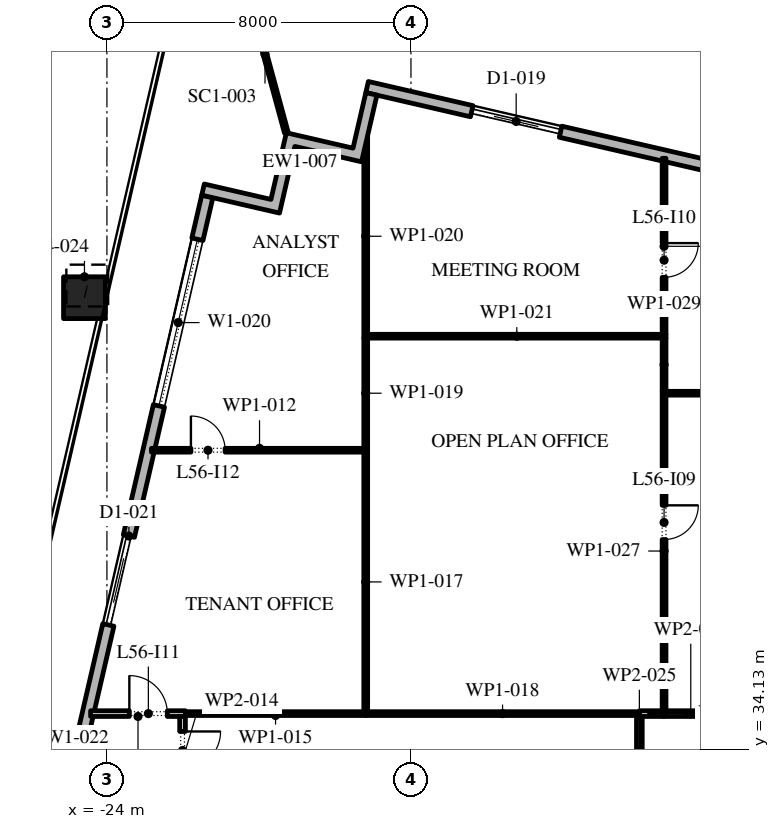
"""IFC4 building model, lengths in metres.
Left out: names, types, materials, properties, quantities, classifications, styles, units other than length and angle.
Written with IfcOpenShell. Run it as: python <this file> out.ifc"""

import sys

from ifc_helpers import new_model, si_unit, direction, frame, frame_2d, origin, origin_2d, place, context, subcontext, project, spatial, polyline, rectangle, outline, extrude, element, fill, save


model = new_model("IFC4")
c1 = context("Model", 3, precision=1e-05, world=origin(), true_north=direction((0.0, 1.0)))
c2 = subcontext(c1, "Body", "Model", "MODEL_VIEW")
j1 = project(units=[si_unit("LENGTHUNIT", "METRE"), si_unit("PLANEANGLEUNIT", "RADIAN")], contexts=[c1])
p1 = place(None, origin())
s1 = spatial("IfcSite", under=j1, at=p1, CompositionType="ELEMENT")
p2 = place(p1, origin())
s2 = spatial("IfcBuilding", under=s1, at=p2, CompositionType="ELEMENT")
p3 = place(p2, frame((0.0, 0.0, 259.8)))
s3 = spatial("IfcBuildingStorey", under=s2, at=p3, CompositionType="ELEMENT", Elevation=259.8)
p4 = place(p3, frame((-24.591, 46.014, 0.0), z_axis=(0.017502025619, 0.075687567741, 0.996977969259), x_axis=(-0.974290512438, 0.225295355862, 0.0)))
e1 = element("IfcColumn", 1, at=p4, inside=s3, PredefinedType="COLUMN", context=c2, shape_type="SweptSolid", body=[
    extrude(rectangle(XDim=1.1, YDim=1.1, at=origin_2d()), origin(), (0.0, 0.0, 1.0), 4.213),
])
p5 = place(p3, frame((29.616, 40.758, 0.0), z_axis=(0.0, 0.0, 1.0), x_axis=(-0.974370532314, 0.224949029246, 0.0)))
e2 = element("IfcWall", 2, at=p5, inside=s3, PredefinedType="STANDARD", context=c2, shape_type="SweptSolid", body=[
    extrude(rectangle(XDim=48.0, YDim=0.3, at=frame_2d((24.0, 0.0))), origin(), (0.0, 0.0, 1.0), 4.0),
])
p6 = place(p5, frame((1.625, 0.0, 0.45)))
e3 = element("IfcOpeningElement", 3, at=p6, cuts=e2, PredefinedType="OPENING", context=c2, shape_type="SweptSolid", body=[
    extrude(rectangle(XDim=4.5, YDim=2.65, at=frame_2d((2.25, 1.325))), frame((0.0, 0.16, 0.0), z_axis=(0.0, -1.0, 0.0), x_axis=(1.0, 0.0, 0.0)), (0.0, 0.0, 1.0), 0.32),
])
p7 = place(p5, frame((10.575, 0.0, 0.0)))
e4 = element("IfcOpeningElement", 4, at=p7, cuts=e2, PredefinedType="OPENING", context=c2, shape_type="SweptSolid", body=[
    extrude(rectangle(XDim=2.4, YDim=3.5, at=frame_2d((1.2, 1.75))), frame((0.0, 0.16, 0.0), z_axis=(0.0, -1.0, 0.0), x_axis=(1.0, 0.0, 0.0)), (0.0, 0.0, 1.0), 0.32),
])
p8 = place(p5, frame((17.575, 0.0, 0.45)))
e5 = element("IfcOpeningElement", 5, at=p8, cuts=e2, PredefinedType="OPENING", context=c2, shape_type="SweptSolid", body=[
    extrude(rectangle(XDim=4.5, YDim=2.5, at=frame_2d((2.25, 1.25))), frame((0.0, 0.16, 0.0), z_axis=(0.0, -1.0, 0.0), x_axis=(1.0, 0.0, 0.0)), (0.0, 0.0, 1.0), 0.32),
])
p9 = place(p5, frame((25.625, 0.0, 0.45)))
e6 = element("IfcOpeningElement", 6, at=p9, cuts=e2, PredefinedType="OPENING", context=c2, shape_type="SweptSolid", body=[
    extrude(rectangle(XDim=4.5, YDim=2.45, at=frame_2d((2.25, 1.225))), frame((0.0, 0.16, 0.0), z_axis=(0.0, -1.0, 0.0), x_axis=(1.0, 0.0, 0.0)), (0.0, 0.0, 1.0), 0.32),
])
p10 = place(p5, frame((33.675, 0.0, 0.45)))
e7 = element("IfcOpeningElement", 7, at=p10, cuts=e2, PredefinedType="OPENING", context=c2, shape_type="SweptSolid", body=[
    extrude(rectangle(XDim=4.5, YDim=2.45, at=frame_2d((2.25, 1.225))), frame((0.0, 0.16, 0.0), z_axis=(0.0, -1.0, 0.0), x_axis=(1.0, 0.0, 0.0)), (0.0, 0.0, 1.0), 0.32),
])
p11 = place(p5, frame((42.775, 0.0, 0.0)))
e8 = element("IfcOpeningElement", 8, at=p11, cuts=e2, PredefinedType="OPENING", context=c2, shape_type="SweptSolid", body=[
    extrude(rectangle(XDim=2.4, YDim=3.5, at=frame_2d((1.2, 1.75))), frame((0.0, 0.16, 0.0), z_axis=(0.0, -1.0, 0.0), x_axis=(1.0, 0.0, 0.0)), (0.0, 0.0, 1.0), 0.32),
])
p12 = place(p3, frame((-21.359, 48.678, 0.0), z_axis=(0.0, 0.0, 1.0), x_axis=(-0.224949198343, -0.974370493275, 0.0)))
e9 = element("IfcWall", 9, at=p12, inside=s3, PredefinedType="STANDARD", context=c2, shape_type="SweptSolid", body=[
    extrude(rectangle(XDim=49.5, YDim=0.3, at=frame_2d((24.75, 0.0))), origin(), (0.0, 0.0, 1.0), 4.0),
])
p13 = place(p12, frame((1.157, 0.0, 0.45)))
e10 = element("IfcOpeningElement", 10, at=p13, cuts=e9, PredefinedType="OPENING", context=c2, shape_type="SweptSolid", body=[
    extrude(rectangle(XDim=4.5, YDim=3.05, at=frame_2d((2.25, 1.525))), frame((0.0, 0.16, 0.0), z_axis=(0.0, -1.0, 0.0), x_axis=(1.0, 0.0, 0.0)), (0.0, 0.0, 1.0), 0.32),
])
p14 = place(p12, frame((9.171, 0.0, 0.0)))
e11 = element("IfcOpeningElement", 11, at=p14, cuts=e9, PredefinedType="OPENING", context=c2, shape_type="SweptSolid", body=[
    extrude(rectangle(XDim=2.4, YDim=3.5, at=frame_2d((1.2, 1.75))), frame((0.0, 0.16, 0.0), z_axis=(0.0, -1.0, 0.0), x_axis=(1.0, 0.0, 0.0)), (0.0, 0.0, 1.0), 0.32),
])
p15 = place(p12, frame((15.236, 0.0, 0.45)))
e12 = element("IfcOpeningElement", 12, at=p15, cuts=e9, PredefinedType="OPENING", context=c2, shape_type="SweptSolid", body=[
    extrude(rectangle(XDim=4.5, YDim=3.05, at=frame_2d((2.25, 1.525))), frame((0.0, 0.16, 0.0), z_axis=(0.0, -1.0, 0.0), x_axis=(1.0, 0.0, 0.0)), (0.0, 0.0, 1.0), 0.32),
])
p16 = place(p12, frame((22.35, 0.0, 0.45)))
e13 = element("IfcOpeningElement", 13, at=p16, cuts=e9, PredefinedType="OPENING", context=c2, shape_type="SweptSolid", body=[
    extrude(rectangle(XDim=4.5, YDim=3.05, at=frame_2d((2.25, 1.525))), frame((0.0, 0.16, 0.0), z_axis=(0.0, -1.0, 0.0), x_axis=(1.0, 0.0, 0.0)), (0.0, 0.0, 1.0), 0.32),
])
p17 = place(p12, frame((29.464, 0.0, 0.45)))
e14 = element("IfcOpeningElement", 14, at=p17, cuts=e9, PredefinedType="OPENING", context=c2, shape_type="SweptSolid", body=[
    extrude(rectangle(XDim=4.5, YDim=3.05, at=frame_2d((2.25, 1.525))), frame((0.0, 0.16, 0.0), z_axis=(0.0, -1.0, 0.0), x_axis=(1.0, 0.0, 0.0)), (0.0, 0.0, 1.0), 0.32),
])
p18 = place(p12, frame((37.628, 0.0, 0.0)))
e15 = element("IfcOpeningElement", 15, at=p18, cuts=e9, PredefinedType="OPENING", context=c2, shape_type="SweptSolid", body=[
    extrude(rectangle(XDim=2.4, YDim=3.325, at=frame_2d((1.2, 1.663))), frame((0.0, 0.16, 0.0), z_axis=(0.0, -1.0, 0.0), x_axis=(1.0, 0.0, 0.0)), (0.0, 0.0, 1.0), 0.32),
])
p19 = place(p12, frame((43.693, 0.0, 0.45)))
e16 = element("IfcOpeningElement", 16, at=p19, cuts=e9, PredefinedType="OPENING", context=c2, shape_type="SweptSolid", body=[
    extrude(rectangle(XDim=4.5, YDim=2.825, at=frame_2d((2.25, 1.413))), frame((0.0, 0.16, 0.0), z_axis=(0.0, -1.0, 0.0), x_axis=(1.0, 0.0, 0.0)), (0.0, 0.0, 1.0), 0.32),
])
p20 = place(p3, origin())
e17 = element("IfcWall", 17, at=p20, inside=s3, PredefinedType="STANDARD", context=c2, shape_type="SweptSolid", body=[
    extrude(outline(polyline([(-21.505, 48.712), (-21.438, 49.004), (-19.684, 48.599), (-19.279, 50.353), (-17.525, 49.948), (-17.188, 51.41), (-16.895, 51.342), (-17.3, 49.588), (-19.054, 49.993), (-19.459, 48.24), (-21.505, 48.712)])), origin(), (0.0, 0.0, 1.0), 4.0),
])
p21 = place(p3, frame((-19.279, 50.353, -0.05), z_axis=(0.0, 0.0, 1.0), x_axis=(-0.262465429481, 0.964941396318, 0.0)))
e18 = element("IfcWall", 18, at=p21, inside=s3, PredefinedType="STANDARD", context=c2, shape_type="SweptSolid", body=[
    extrude(rectangle(XDim=4.278, YDim=0.1, at=frame_2d((2.139, 0.0))), origin(), (0.0, 0.0, 1.0), 4.05),
])
p22 = place(p3, frame((-24.429, 35.07, 0.0), z_axis=(0.0, 0.0, 1.0), x_axis=(1.0, 0.0, 0.0)))
e19 = element("IfcWall", 19, at=p22, inside=s3, PredefinedType="PARTITIONING", context=c2, shape_type="SweptSolid", body=[
    extrude(rectangle(XDim=2.494, YDim=0.15, at=frame_2d((1.247, 0.0))), origin(), (0.0, 0.0, 1.0), 4.0),
])
p23 = place(p22, frame((1.019, 0.0, 0.0)))
e20 = element("IfcOpeningElement", 20, at=p23, cuts=e19, PredefinedType="OPENING", context=c2, shape_type="SweptSolid", body=[
    extrude(rectangle(XDim=1.0, YDim=2.1, at=frame_2d((0.5, 1.05))), frame((0.0, 0.085, 0.0), z_axis=(0.0, -1.0, 0.0), x_axis=(1.0, 0.0, 0.0)), (0.0, 0.0, 1.0), 0.17),
])
p24 = place(p3, frame((-22.829, 42.0, 0.0), z_axis=(0.0, 0.0, 1.0), x_axis=(1.0, 0.0, 0.0)))
e21 = element("IfcWall", 21, at=p24, inside=s3, PredefinedType="PARTITIONING", context=c2, shape_type="SweptSolid", body=[
    extrude(rectangle(XDim=5.689, YDim=0.1, at=frame_2d((2.845, 0.0))), origin(), (0.0, 0.0, 1.0), 4.0),
])
p25 = place(p24, frame((1.039, 0.0, 0.0)))
e22 = element("IfcOpeningElement", 22, at=p25, cuts=e21, PredefinedType="OPENING", context=c2, shape_type="SweptSolid", body=[
    extrude(rectangle(XDim=0.9, YDim=2.1, at=frame_2d((0.45, 1.05))), frame((0.0, 0.06, 0.0), z_axis=(0.0, -1.0, 0.0), x_axis=(1.0, 0.0, 0.0)), (0.0, 0.0, 1.0), 0.12),
])
p26 = place(p3, frame((-22.01, 34.995, 0.0), z_axis=(0.0, 0.0, 1.0), x_axis=(0.0, -1.0, 0.0)))
e23 = element("IfcWall", 23, at=p26, inside=s3, PredefinedType="PARTITIONING", context=c2, shape_type="SweptSolid", body=[
    extrude(rectangle(XDim=2.295, YDim=0.15, at=frame_2d((1.147, 0.0))), origin(), (0.0, 0.0, 1.0), 4.0),
])
p27 = place(p26, frame((0.395, 0.0, 0.0)))
e24 = element("IfcOpeningElement", 24, at=p27, cuts=e23, PredefinedType="OPENING", context=c2, shape_type="SweptSolid", body=[
    extrude(rectangle(XDim=1.0, YDim=2.1, at=frame_2d((0.5, 1.05))), frame((0.0, 0.085, 0.0), z_axis=(0.0, -1.0, 0.0), x_axis=(1.0, 0.0, 0.0)), (0.0, 0.0, 1.0), 0.17),
])
p28 = place(p3, frame((-21.935, 35.07, 0.0), z_axis=(0.0, 0.0, 1.0), x_axis=(1.0, 0.0, 0.0)))
e25 = element("IfcWall", 25, at=p28, inside=s3, PredefinedType="PARTITIONING", context=c2, shape_type="SweptSolid", body=[
    extrude(rectangle(XDim=4.745, YDim=0.1, at=frame_2d((2.373, 0.0))), origin(), (0.0, 0.0, 1.0), 4.0),
])
p29 = place(p3, frame((-17.19, 35.12, 0.0), z_axis=(0.0, 0.0, 1.0), x_axis=(0.0, 1.0, 0.0)))
e26 = element("IfcWall", 26, at=p29, inside=s3, PredefinedType="PARTITIONING", context=c2, shape_type="SweptSolid", body=[
    extrude(rectangle(XDim=6.83, YDim=0.1, at=frame_2d((3.415, 0.0))), origin(), (0.0, 0.0, 1.0), 4.0),
])
p30 = place(p3, frame((-17.19, 35.07, 0.0), z_axis=(0.0, 0.0, 1.0), x_axis=(1.0, 0.0, 0.0)))
e27 = element("IfcWall", 27, at=p30, inside=s3, PredefinedType="PARTITIONING", context=c2, shape_type="SweptSolid", body=[
    extrude(rectangle(XDim=7.2, YDim=0.1, at=frame_2d((3.6, 0.0))), origin(), (0.0, 0.0, 1.0), 4.0),
])
p31 = place(p3, frame((-17.19, 42.05, 0.0), z_axis=(0.0, 0.0, 1.0), x_axis=(0.0, 1.0, 0.0)))
e28 = element("IfcWall", 28, at=p31, inside=s3, PredefinedType="PARTITIONING", context=c2, shape_type="SweptSolid", body=[
    extrude(rectangle(XDim=2.9, YDim=0.1, at=frame_2d((1.45, 0.0))), origin(), (0.0, 0.0, 1.0), 4.0),
])
p32 = place(p3, frame((-17.19, 44.95, 0.0), z_axis=(0.0, 0.0, 1.0), x_axis=(0.0, 1.0, 0.0)))
e29 = element("IfcWall", 29, at=p32, inside=s3, PredefinedType="PARTITIONING", context=c2, shape_type="SweptSolid", body=[
    extrude(rectangle(XDim=5.36, YDim=0.1, at=frame_2d((2.68, 0.0))), origin(), (0.0, 0.0, 1.0), 4.0),
])
p33 = place(p3, frame((-17.14, 45.0, 0.0), z_axis=(0.0, 0.0, 1.0), x_axis=(1.0, 0.0, 0.0)))
e30 = element("IfcWall", 30, at=p33, inside=s3, PredefinedType="PARTITIONING", context=c2, shape_type="SweptSolid", body=[
    extrude(rectangle(XDim=7.85, YDim=0.1, at=frame_2d((3.925, 0.0))), origin(), (0.0, 0.0, 1.0), 4.0),
])
p34 = place(p3, frame((-9.99, 32.7, 0.0), z_axis=(0.0, 0.0, 1.0), x_axis=(0.0, 1.0, 0.0)))
e31 = element("IfcWall", 31, at=p34, inside=s3, PredefinedType="PARTITIONING", context=c2, shape_type="SweptSolid", body=[
    extrude(rectangle(XDim=2.32, YDim=0.15, at=frame_2d((1.16, 0.0))), origin(), (0.0, 0.0, 1.0), 4.0),
])
p35 = place(p3, frame((-9.99, 35.07, 0.0), z_axis=(0.0, 0.0, 1.0), x_axis=(1.0, 0.0, 0.0)))
e32 = element("IfcWall", 32, at=p35, inside=s3, PredefinedType="PARTITIONING", context=c2, shape_type="SweptSolid", body=[
    extrude(rectangle(XDim=0.65, YDim=0.15, at=frame_2d((0.325, 0.0))), origin(), (0.0, 0.0, 1.0), 4.0),
])
p36 = place(p3, frame((-9.34, 35.145, 0.0), z_axis=(0.0, 0.0, 1.0), x_axis=(0.0, 1.0, 0.0)))
e33 = element("IfcWall", 33, at=p36, inside=s3, PredefinedType="PARTITIONING", context=c2, shape_type="SweptSolid", body=[
    extrude(rectangle(XDim=8.405, YDim=0.1, at=frame_2d((4.203, 0.0))), origin(), (0.0, 0.0, 1.0), 4.0),
])
p37 = place(p36, frame((4.505, 0.0, 0.0)))
e34 = element("IfcOpeningElement", 34, at=p37, cuts=e33, PredefinedType="OPENING", context=c2, shape_type="SweptSolid", body=[
    extrude(rectangle(XDim=0.9, YDim=2.1, at=frame_2d((0.45, 1.05))), frame((0.0, 0.06, 0.0), z_axis=(0.0, -1.0, 0.0), x_axis=(1.0, 0.0, 0.0)), (0.0, 0.0, 1.0), 0.12),
])
p38 = place(p3, frame((-9.34, 35.07, 0.0), z_axis=(0.0, 0.0, 1.0), x_axis=(1.0, 0.0, 0.0)))
e35 = element("IfcWall", 35, at=p38, inside=s3, PredefinedType="PARTITIONING", context=c2, shape_type="SweptSolid", body=[
    extrude(rectangle(XDim=1.405, YDim=0.15, at=frame_2d((0.703, 0.0))), origin(), (0.0, 0.0, 1.0), 4.0),
])
p39 = place(p3, frame((-9.34, 43.55, 0.0), z_axis=(0.0, 0.0, 1.0), x_axis=(0.0, 1.0, 0.0)))
e36 = element("IfcWall", 36, at=p39, inside=s3, PredefinedType="PARTITIONING", context=c2, shape_type="SweptSolid", body=[
    extrude(rectangle(XDim=1.4, YDim=0.1, at=frame_2d((0.7, 0.0))), origin(), (0.0, 0.0, 1.0), 4.0),
])
p40 = place(p3, frame((-9.29, 43.5, 0.0), z_axis=(0.0, 0.0, 1.0), x_axis=(1.0, 0.0, 0.0)))
e37 = element("IfcWall", 37, at=p40, inside=s3, PredefinedType="PARTITIONING", context=c2, shape_type="SweptSolid", body=[
    extrude(rectangle(XDim=8.265, YDim=0.1, at=frame_2d((4.133, 0.0))), origin(), (0.0, 0.0, 1.0), 4.0),
])
p41 = place(p3, frame((-9.34, 45.05, 0.0), z_axis=(0.0, 0.0, 1.0), x_axis=(0.0, 1.0, 0.0)))
e38 = element("IfcWall", 38, at=p41, inside=s3, PredefinedType="PARTITIONING", context=c2, shape_type="SweptSolid", body=[
    extrude(rectangle(XDim=4.631, YDim=0.1, at=frame_2d((2.315, 0.0))), origin(), (0.0, 0.0, 1.0), 4.0),
])
p42 = place(p41, frame((1.5, 0.0, 0.0)))
e39 = element("IfcOpeningElement", 39, at=p42, cuts=e38, PredefinedType="OPENING", context=c2, shape_type="SweptSolid", body=[
    extrude(rectangle(XDim=0.9, YDim=2.1, at=frame_2d((0.45, 1.05))), frame((0.0, 0.06, 0.0), z_axis=(0.0, -1.0, 0.0), x_axis=(1.0, 0.0, 0.0)), (0.0, 0.0, 1.0), 0.12),
])
p43 = place(p11, origin())
e40 = element("IfcDoor", 40, at=p43, inside=s3, OperationType="DOUBLE_DOOR_SLIDING", PredefinedType="DOOR", context=c2, shape_type="SweptSolid", body=[
    extrude(rectangle(XDim=2.4, YDim=3.5, at=frame_2d((1.2, 1.75))), frame((0.0, 0.025, 0.0), z_axis=(0.0, -1.0, 0.0), x_axis=(1.0, 0.0, 0.0)), (0.0, 0.0, 1.0), 0.05),
])
fill(e8, e40)
p44 = place(p13, origin())
e41 = element("IfcWindow", 41, at=p44, inside=s3, PartitioningType="DOUBLE_PANEL_VERTICAL", PredefinedType="WINDOW", context=c2, shape_type="SweptSolid", body=[
    extrude(rectangle(XDim=4.5, YDim=3.05, at=frame_2d((2.25, 1.525))), frame((0.0, 0.03, 0.0), z_axis=(0.0, -1.0, 0.0), x_axis=(1.0, 0.0, 0.0)), (0.0, 0.0, 1.0), 0.06),
])
fill(e10, e41)
p45 = place(p14, origin())
e42 = element("IfcDoor", 42, at=p45, inside=s3, OperationType="DOUBLE_DOOR_SLIDING", PredefinedType="DOOR", context=c2, shape_type="SweptSolid", body=[
    extrude(rectangle(XDim=2.4, YDim=3.5, at=frame_2d((1.2, 1.75))), frame((0.0, 0.025, 0.0), z_axis=(0.0, -1.0, 0.0), x_axis=(1.0, 0.0, 0.0)), (0.0, 0.0, 1.0), 0.05),
])
fill(e11, e42)
p46 = place(p27, origin())
e43 = element("IfcDoor", 43, at=p46, inside=s3, OperationType="SINGLE_SWING_RIGHT", PredefinedType="DOOR", context=c2, shape_type="SweptSolid", body=[
    extrude(rectangle(XDim=1.0, YDim=2.1, at=frame_2d((0.5, 1.05))), frame((0.0, 0.025, 0.0), z_axis=(0.0, -1.0, 0.0), x_axis=(1.0, 0.0, 0.0)), (0.0, 0.0, 1.0), 0.05),
])
fill(e24, e43)
p47 = place(p37, frame((0.9, 0.0, 0.0), z_axis=(0.0, 0.0, 1.0), x_axis=(-1.0, 0.0, 0.0)))
e44 = element("IfcDoor", 44, at=p47, inside=s3, OperationType="SINGLE_SWING_RIGHT", PredefinedType="DOOR", context=c2, shape_type="SweptSolid", body=[
    extrude(rectangle(XDim=0.9, YDim=2.1, at=frame_2d((0.45, 1.05))), frame((0.0, 0.025, 0.0), z_axis=(0.0, -1.0, 0.0), x_axis=(1.0, 0.0, 0.0)), (0.0, 0.0, 1.0), 0.05),
])
fill(e34, e44)
p48 = place(p42, frame((0.9, 0.0, 0.0), z_axis=(0.0, 0.0, 1.0), x_axis=(-1.0, 0.0, 0.0)))
e45 = element("IfcDoor", 45, at=p48, inside=s3, OperationType="SINGLE_SWING_RIGHT", PredefinedType="DOOR", context=c2, shape_type="SweptSolid", body=[
    extrude(rectangle(XDim=0.9, YDim=2.1, at=frame_2d((0.45, 1.05))), frame((0.0, 0.025, 0.0), z_axis=(0.0, -1.0, 0.0), x_axis=(1.0, 0.0, 0.0)), (0.0, 0.0, 1.0), 0.05),
])
fill(e39, e45)
p49 = place(p23, origin())
e46 = element("IfcDoor", 46, at=p49, inside=s3, OperationType="SINGLE_SWING_RIGHT", PredefinedType="DOOR", context=c2, shape_type="SweptSolid", body=[
    extrude(rectangle(XDim=1.0, YDim=2.1, at=frame_2d((0.5, 1.05))), frame((0.0, 0.025, 0.0), z_axis=(0.0, -1.0, 0.0), x_axis=(1.0, 0.0, 0.0)), (0.0, 0.0, 1.0), 0.05),
])
fill(e20, e46)
p50 = place(p25, origin())
e47 = element("IfcDoor", 47, at=p50, inside=s3, OperationType="SINGLE_SWING_RIGHT", PredefinedType="DOOR", context=c2, shape_type="SweptSolid", body=[
    extrude(rectangle(XDim=0.9, YDim=2.1, at=frame_2d((0.45, 1.05))), frame((0.0, 0.025, 0.0), z_axis=(0.0, -1.0, 0.0), x_axis=(1.0, 0.0, 0.0)), (0.0, 0.0, 1.0), 0.05),
])
fill(e22, e47)
save(model, sys.argv[1])
